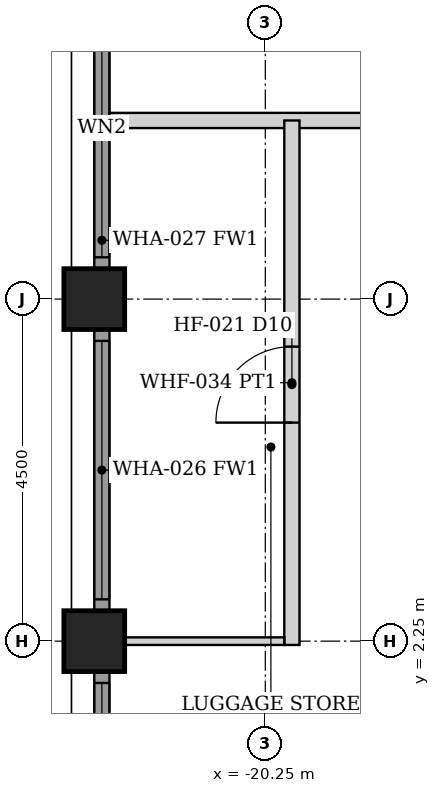
"""IFC4 building model, lengths in metres.
Left out: names, types, materials, properties, quantities, classifications, styles, units other than length and angle.
Written with IfcOpenShell. Run it as: python <this file> out.ifc"""

import sys

from ifc_helpers import new_model, si_unit, direction, frame, frame_2d, origin, origin_2d, place, context, subcontext, project, spatial, rectangle, hollow_rectangle, extrude, element, fill, save


model = new_model("IFC4")
c1 = context("Model", 3, precision=1e-05, world=origin(), true_north=direction((0.0, 1.0)))
c2 = subcontext(c1, "Body", "Model", "MODEL_VIEW")
j1 = project(units=[si_unit("LENGTHUNIT", "METRE"), si_unit("PLANEANGLEUNIT", "RADIAN")], contexts=[c1])
p1 = place(None, origin())
s1 = spatial("IfcSite", under=j1, at=p1, CompositionType="ELEMENT")
p2 = place(p1, origin())
s2 = spatial("IfcBuilding", under=s1, at=p2, CompositionType="ELEMENT")
p3 = place(p2, frame((0.0, 0.0, 172.4)))
s3 = spatial("IfcBuildingStorey", under=s2, at=p3, CompositionType="ELEMENT", Elevation=172.4)
for number, where, z_axis, x_axis in (
    (1, (-22.5, 2.25, 0.0), (0.0, 0.0, 1.0), (1.0, 0.0, 0.0)),
    (2, (-22.5, 6.75, 0.0), (0.0, 0.0, 1.0), (1.0, 0.0, 0.0)),
):
    element("IfcColumn", number, at=place(p3, frame(where, z_axis=z_axis, x_axis=x_axis)), inside=s3, PredefinedType="COLUMN", context=c2, shape_type="SweptSolid", body=[
        extrude(hollow_rectangle(XDim=0.8, YDim=0.8, WallThickness=0.045, at=origin_2d()), origin(), (0.0, 0.0, 1.0), 3.6),
    ])
p4 = place(p3, frame((-22.4, -1.845, 0.0), z_axis=(0.0, 0.0, 1.0), x_axis=(0.0, 1.0, 0.0)))
e3 = element("IfcWall", 3, at=p4, inside=s3, PredefinedType="SOLIDWALL", context=c2, shape_type="SweptSolid", body=[
    extrude(rectangle(XDim=3.69, YDim=0.2, at=frame_2d((1.845, 0.0))), origin(), (0.0, 0.0, 1.0), 2.479),
])
p5 = place(p4, frame((0.145, 0.0, 0.3)))
e4 = element("IfcOpeningElement", 4, at=p5, cuts=e3, PredefinedType="OPENING", context=c2, shape_type="SweptSolid", body=[
    extrude(rectangle(XDim=3.4, YDim=2.029, at=frame_2d((1.7, 1.015))), frame((0.0, 0.11, 0.0), z_axis=(0.0, -1.0, 0.0), x_axis=(1.0, 0.0, 0.0)), (0.0, 0.0, 1.0), 0.22),
])
p6 = place(p3, frame((-22.4, 2.655, 0.0), z_axis=(0.0, 0.0, 1.0), x_axis=(0.0, 1.0, 0.0)))
e5 = element("IfcWall", 5, at=p6, inside=s3, PredefinedType="SOLIDWALL", context=c2, shape_type="SweptSolid", body=[
    extrude(rectangle(XDim=3.69, YDim=0.2, at=frame_2d((1.845, 0.0))), origin(), (0.0, 0.0, 1.0), 2.479),
])
p7 = place(p6, frame((0.145, 0.0, 0.3)))
e6 = element("IfcOpeningElement", 6, at=p7, cuts=e5, PredefinedType="OPENING", context=c2, shape_type="SweptSolid", body=[
    extrude(rectangle(XDim=3.4, YDim=2.029, at=frame_2d((1.7, 1.015))), frame((0.0, 0.11, 0.0), z_axis=(0.0, -1.0, 0.0), x_axis=(1.0, 0.0, 0.0)), (0.0, 0.0, 1.0), 0.22),
])
p8 = place(p3, frame((-22.4, 7.155, 0.0), z_axis=(0.0, 0.0, 1.0), x_axis=(0.0, 1.0, 0.0)))
e7 = element("IfcWall", 7, at=p8, inside=s3, PredefinedType="SOLIDWALL", context=c2, shape_type="SweptSolid", body=[
    extrude(rectangle(XDim=3.69, YDim=0.2, at=frame_2d((1.845, 0.0))), origin(), (0.0, 0.0, 1.0), 2.479),
])
p9 = place(p8, frame((0.145, 0.0, 0.3)))
e8 = element("IfcOpeningElement", 8, at=p9, cuts=e7, PredefinedType="OPENING", context=c2, shape_type="SweptSolid", body=[
    extrude(rectangle(XDim=3.4, YDim=2.029, at=frame_2d((1.7, 1.015))), frame((0.0, 0.11, 0.0), z_axis=(0.0, -1.0, 0.0), x_axis=(1.0, 0.0, 0.0)), (0.0, 0.0, 1.0), 0.22),
])
p10 = place(p3, frame((-22.3, 9.1, 0.0), z_axis=(0.0, 0.0, 1.0), x_axis=(1.0, 0.0, 0.0)))
e9 = element("IfcWall", 9, at=p10, inside=s3, PredefinedType="PARTITIONING", context=c2, shape_type="SweptSolid", body=[
    extrude(rectangle(XDim=44.6, YDim=0.2, at=frame_2d((22.3, 0.0))), origin(), (0.0, 0.0, 1.0), 2.473),
])
p11 = place(p10, frame((11.35, 0.0, 0.0)))
e10 = element("IfcOpeningElement", 10, at=p11, cuts=e9, PredefinedType="OPENING", context=c2, shape_type="SweptSolid", body=[
    extrude(rectangle(XDim=0.9, YDim=2.1, at=frame_2d((0.45, 1.05))), frame((0.0, 0.11, 0.0), z_axis=(0.0, -1.0, 0.0), x_axis=(1.0, 0.0, 0.0)), (0.0, 0.0, 1.0), 0.22),
])
p12 = place(p10, frame((18.95, 0.0, 0.0)))
e11 = element("IfcOpeningElement", 11, at=p12, cuts=e9, PredefinedType="OPENING", context=c2, shape_type="SweptSolid", body=[
    extrude(rectangle(XDim=0.9, YDim=2.1, at=frame_2d((0.45, 1.05))), frame((0.0, 0.11, 0.0), z_axis=(0.0, -1.0, 0.0), x_axis=(1.0, 0.0, 0.0)), (0.0, 0.0, 1.0), 0.22),
])
p13 = place(p10, frame((20.25, 0.0, 0.0)))
e12 = element("IfcOpeningElement", 12, at=p13, cuts=e9, PredefinedType="OPENING", context=c2, shape_type="SweptSolid", body=[
    extrude(rectangle(XDim=0.9, YDim=2.1, at=frame_2d((0.45, 1.05))), frame((0.0, 0.11, 0.0), z_axis=(0.0, -1.0, 0.0), x_axis=(1.0, 0.0, 0.0)), (0.0, 0.0, 1.0), 0.22),
])
p14 = place(p10, frame((32.45, 0.0, 0.0)))
e13 = element("IfcOpeningElement", 13, at=p14, cuts=e9, PredefinedType="OPENING", context=c2, shape_type="SweptSolid", body=[
    extrude(rectangle(XDim=0.9, YDim=2.1, at=frame_2d((0.45, 1.05))), frame((0.0, 0.11, 0.0), z_axis=(0.0, -1.0, 0.0), x_axis=(1.0, 0.0, 0.0)), (0.0, 0.0, 1.0), 0.22),
])
p15 = place(p10, frame((36.95, 0.0, 0.0)))
e14 = element("IfcOpeningElement", 14, at=p15, cuts=e9, PredefinedType="OPENING", context=c2, shape_type="SweptSolid", body=[
    extrude(rectangle(XDim=0.9, YDim=2.1, at=frame_2d((0.45, 1.05))), frame((0.0, 0.11, 0.0), z_axis=(0.0, -1.0, 0.0), x_axis=(1.0, 0.0, 0.0)), (0.0, 0.0, 1.0), 0.22),
])
p16 = place(p10, frame((38.85, 0.0, 0.0)))
e15 = element("IfcOpeningElement", 15, at=p16, cuts=e9, PredefinedType="OPENING", context=c2, shape_type="SweptSolid", body=[
    extrude(rectangle(XDim=0.9, YDim=2.1, at=frame_2d((0.45, 1.05))), frame((0.0, 0.11, 0.0), z_axis=(0.0, -1.0, 0.0), x_axis=(1.0, 0.0, 0.0)), (0.0, 0.0, 1.0), 0.22),
])
p17 = place(p10, frame((4.85, 0.0, 0.0)))
e16 = element("IfcOpeningElement", 16, at=p17, cuts=e9, PredefinedType="OPENING", context=c2, shape_type="SweptSolid", body=[
    extrude(rectangle(XDim=0.9, YDim=2.1, at=frame_2d((0.45, 1.05))), frame((0.0, 0.11, 0.0), z_axis=(0.0, -1.0, 0.0), x_axis=(1.0, 0.0, 0.0)), (0.0, 0.0, 1.0), 0.22),
])
p18 = place(p3, frame((-19.9, 2.2, 0.0), z_axis=(0.0, 0.0, 1.0), x_axis=(0.0, 1.0, 0.0)))
e17 = element("IfcWall", 17, at=p18, inside=s3, PredefinedType="PARTITIONING", context=c2, shape_type="SweptSolid", body=[
    extrude(rectangle(XDim=6.9, YDim=0.2, at=frame_2d((3.45, 0.0))), origin(), (0.0, 0.0, 1.0), 2.473),
])
p19 = place(p18, frame((2.925, 0.0, 0.0)))
e18 = element("IfcOpeningElement", 18, at=p19, cuts=e17, PredefinedType="OPENING", context=c2, shape_type="SweptSolid", body=[
    extrude(rectangle(XDim=1.0, YDim=2.1, at=frame_2d((0.5, 1.05))), frame((0.0, 0.11, 0.0), z_axis=(0.0, -1.0, 0.0), x_axis=(1.0, 0.0, 0.0)), (0.0, 0.0, 1.0), 0.22),
])
p20 = place(p3, frame((-22.1, 2.25, 0.0), z_axis=(0.0, 0.0, 1.0), x_axis=(1.0, 0.0, 0.0)))
e19 = element("IfcWall", 19, at=p20, inside=s3, PredefinedType="PARTITIONING", context=c2, shape_type="SweptSolid", body=[
    extrude(rectangle(XDim=2.1, YDim=0.1, at=frame_2d((1.05, 0.0))), origin(), (0.0, 0.0, 1.0), 2.473),
])
p21 = place(p5, origin())
e20 = element("IfcWindow", 20, at=p21, inside=s3, PartitioningType="SINGLE_PANEL", PredefinedType="WINDOW", context=c2, shape_type="SweptSolid", body=[
    extrude(rectangle(XDim=3.4, YDim=2.029, at=frame_2d((1.7, 1.015))), frame((0.0, 0.03, 0.0), z_axis=(0.0, -1.0, 0.0), x_axis=(1.0, 0.0, 0.0)), (0.0, 0.0, 1.0), 0.06),
])
fill(e4, e20)
p22 = place(p7, origin())
e21 = element("IfcWindow", 21, at=p22, inside=s3, PartitioningType="SINGLE_PANEL", PredefinedType="WINDOW", context=c2, shape_type="SweptSolid", body=[
    extrude(rectangle(XDim=3.4, YDim=2.029, at=frame_2d((1.7, 1.015))), frame((0.0, 0.03, 0.0), z_axis=(0.0, -1.0, 0.0), x_axis=(1.0, 0.0, 0.0)), (0.0, 0.0, 1.0), 0.06),
])
fill(e6, e21)
p23 = place(p9, origin())
e22 = element("IfcWindow", 22, at=p23, inside=s3, PartitioningType="SINGLE_PANEL", PredefinedType="WINDOW", context=c2, shape_type="SweptSolid", body=[
    extrude(rectangle(XDim=3.4, YDim=2.029, at=frame_2d((1.7, 1.015))), frame((0.0, 0.03, 0.0), z_axis=(0.0, -1.0, 0.0), x_axis=(1.0, 0.0, 0.0)), (0.0, 0.0, 1.0), 0.06),
])
fill(e8, e22)
p24 = place(p19, origin())
e23 = element("IfcDoor", 23, at=p24, inside=s3, OperationType="SINGLE_SWING_LEFT", PredefinedType="DOOR", context=c2, shape_type="SweptSolid", body=[
    extrude(rectangle(XDim=1.0, YDim=2.1, at=frame_2d((0.5, 1.05))), frame((0.0, 0.025, 0.0), z_axis=(0.0, -1.0, 0.0), x_axis=(1.0, 0.0, 0.0)), (0.0, 0.0, 1.0), 0.05),
])
fill(e18, e23)
save(model, sys.argv[1])
